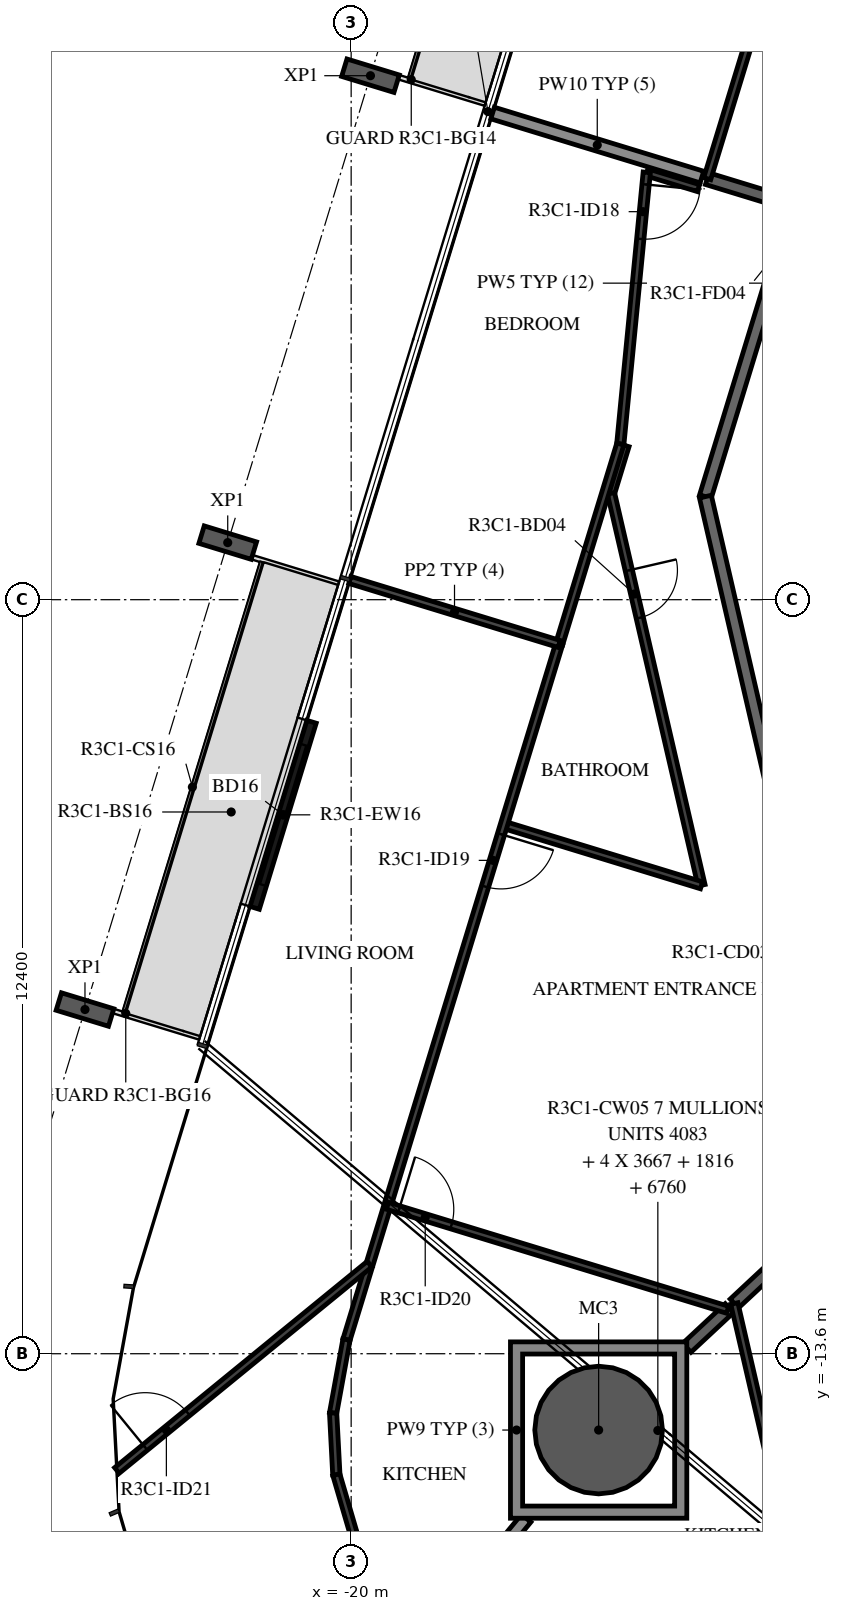
"""IFC4 building model, lengths in metres.
Left out: names, types, materials, properties, quantities, classifications, styles, units other than length and angle.
Written with IfcOpenShell. Run it as: python <this file> out.ifc"""

import sys

from ifc_helpers import new_model, si_unit, direction, frame, frame_2d, origin, origin_2d, place, context, subcontext, project, spatial, polyline, rectangle, hollow_circle, i_section, outline, extrude, element, fill, save


model = new_model("IFC4")
c1 = context("Model", 3, precision=1e-05, world=origin(), true_north=direction((0.0, 1.0)))
c2 = subcontext(c1, "Body", "Model", "MODEL_VIEW")
j1 = project(units=[si_unit("LENGTHUNIT", "METRE"), si_unit("PLANEANGLEUNIT", "RADIAN")], contexts=[c1])
p1 = place(None, origin())
s1 = spatial("IfcSite", under=j1, at=p1, CompositionType="ELEMENT")
p2 = place(p1, origin())
s2 = spatial("IfcBuilding", under=s1, at=p2, CompositionType="ELEMENT")
p3 = place(p2, frame((0.0, 0.0, 137.9)))
s3 = spatial("IfcBuildingStorey", under=s2, at=p3, CompositionType="ELEMENT", Elevation=137.9)
p4 = place(p3, frame((-15.93, -14.855, -0.38), z_axis=(0.0, 0.0, 1.0), x_axis=(1.0, 0.0, 0.0)))
e1 = element("IfcColumn", 1, at=p4, inside=s3, PredefinedType="COLUMN", context=c2, shape_type="SweptSolid", body=[
    extrude(hollow_circle(Radius=1.05, WallThickness=0.05, at=origin_2d()), origin(), (0.0, 0.0, 1.0), 3.5),
])
for number, where, z_axis, x_axis in (
    (2, (-19.682, 7.417, -0.38), (0.0, 0.0, 1.0), (0.292, 0.956, 0.0)),
    (3, (-22.03, -0.261, -0.38), (0.0, 0.0, 1.0), (0.292, 0.956, 0.0)),
    (4, (-24.377, -7.94, -0.38), (0.0, 0.0, 1.0), (0.292, 0.956, 0.0)),
):
    element("IfcColumn", number, at=place(p3, frame(where, z_axis=z_axis, x_axis=x_axis)), inside=s3, PredefinedType="COLUMN", context=c2, shape_type="SweptSolid", body=[
        extrude(i_section(OverallWidth=0.3, OverallDepth=0.9, WebThickness=0.019, FlangeThickness=0.035, FilletRadius=0.03, at=origin_2d()), origin(), (0.0, 0.0, 1.0), 3.5),
    ])
p5 = place(p3, frame((-20.651, -3.208, 0.0), z_axis=(0.0, 0.0, 1.0), x_axis=(-0.292369725807, -0.956305360976, 0.0)))
e5 = element("IfcWall", 5, at=p5, inside=s3, PredefinedType="STANDARD", context=c2, shape_type="SweptSolid", body=[
    extrude(rectangle(XDim=3.2, YDim=0.16, at=frame_2d((1.6, 0.0))), origin(), (0.0, 0.0, 1.0), 3.12),
])
p6 = place(p5, frame((0.4, 0.0, 0.0)))
e6 = element("IfcOpeningElement", 6, at=p6, cuts=e5, PredefinedType="OPENING", context=c2, shape_type="SweptSolid", body=[
    extrude(rectangle(XDim=2.4, YDim=2.4, at=frame_2d((1.2, 1.2))), frame((0.0, 0.09, 0.0), z_axis=(0.0, -1.0, 0.0), x_axis=(1.0, 0.0, 0.0)), (0.0, 0.0, 1.0), 0.18),
])
p7 = place(p3, frame((-12.028, 7.516, 0.0), z_axis=(0.0, 0.0, 1.0), x_axis=(-0.292365533182, -0.956306642771, 0.0)))
e7 = element("IfcWall", 7, at=p7, inside=s3, PredefinedType="STANDARD", context=c2, shape_type="SweptSolid", body=[
    extrude(rectangle(XDim=7.342, YDim=0.2, at=frame_2d((3.671, 0.0))), origin(), (0.0, 0.0, 1.0), 3.12),
])
p8 = place(p7, frame((2.533, 0.0, 0.0)))
e8 = element("IfcOpeningElement", 8, at=p8, cuts=e7, PredefinedType="OPENING", context=c2, shape_type="SweptSolid", body=[
    extrude(rectangle(XDim=1.0, YDim=2.1, at=frame_2d((0.5, 1.05))), frame((0.0, 0.11, 0.0), z_axis=(0.0, -1.0, 0.0), x_axis=(1.0, 0.0, 0.0)), (0.0, 0.0, 1.0), 0.22),
])
p9 = place(p3, frame((-14.175, 0.495, 0.0), z_axis=(0.0, 0.0, 1.0), x_axis=(0.224922649383, -0.974376622151, 0.0)))
e9 = element("IfcWall", 9, at=p9, inside=s3, PredefinedType="STANDARD", context=c2, shape_type="SweptSolid", body=[
    extrude(rectangle(XDim=7.342, YDim=0.2, at=frame_2d((3.671, 0.0))), origin(), (0.0, 0.0, 1.0), 3.12),
])
p10 = place(p3, frame((-14.145, 5.724, 0.0), z_axis=(0.0, 0.0, 1.0), x_axis=(0.956266872747, -0.292495586439, 0.0)))
e10 = element("IfcWall", 10, at=p10, inside=s3, PredefinedType="STANDARD", context=c2, shape_type="SweptSolid", body=[
    extrude(rectangle(XDim=1.5, YDim=0.2, at=frame_2d((0.75, 0.0))), origin(), (0.0, 0.0, 1.0), 3.12),
])
p11 = place(p3, frame((-17.674, 6.803, 0.0), z_axis=(0.0, 0.0, 1.0), x_axis=(0.956293645939, -0.292408041504, 0.0)))
e11 = element("IfcWall", 11, at=p11, inside=s3, PredefinedType="STANDARD", context=c2, shape_type="SweptSolid", body=[
    extrude(rectangle(XDim=3.6, YDim=0.2, at=frame_2d((1.8, 0.0))), origin(), (0.0, 0.0, 1.0), 2.73),
])
p12 = place(p3, frame((-13.699, -12.774, 0.0), z_axis=(0.0, 0.0, 1.0), x_axis=(0.731353758457, 0.681998299111, 0.0)))
e12 = element("IfcWall", 12, at=p12, inside=s3, PredefinedType="STANDARD", context=c2, shape_type="SweptSolid", body=[
    extrude(rectangle(XDim=5.031, YDim=0.2, at=frame_2d((2.515, 0.0))), origin(), (0.0, 0.0, 1.0), 3.12),
])
p13 = place(p3, frame((-21.0, -21.025, 0.0), z_axis=(0.0, 0.0, 1.0), x_axis=(0.634846795952, 0.772638043116, 0.0)))
e13 = element("IfcWall", 13, at=p13, inside=s3, PredefinedType="STANDARD", context=c2, shape_type="SweptSolid", body=[
    extrude(rectangle(XDim=6.109, YDim=0.2, at=frame_2d((3.055, 0.0))), origin(), (0.0, 0.0, 1.0), 2.73),
])
p14 = place(p3, frame((-14.48, -13.503, 0.0), z_axis=(0.0, 0.0, 1.0), x_axis=(0.73152991834, 0.681809341806, 0.0)))
e14 = element("IfcWall", 14, at=p14, inside=s3, PredefinedType="STANDARD", context=c2, shape_type="SweptSolid", body=[
    extrude(rectangle(XDim=0.958, YDim=0.2, at=frame_2d((0.479, 0.0))), origin(), (0.0, 0.0, 1.0), 3.12),
])
p15 = place(p3, frame((-13.345, 8.339, 0.0), z_axis=(0.0, 0.0, 1.0), x_axis=(-0.292316072367, -0.956321762712, 0.0)))
e15 = element("IfcWall", 15, at=p15, inside=s3, PredefinedType="PARTITIONING", context=c2, shape_type="SweptSolid", body=[
    extrude(rectangle(XDim=2.734, YDim=0.12, at=frame_2d((1.367, 0.0))), origin(), (0.0, 0.0, 1.0), 3.12),
])
p16 = place(p3, frame((-14.287, 5.568, 0.0), z_axis=(0.0, 0.0, 1.0), x_axis=(-0.956287662261, 0.292427609859, 0.0)))
e16 = element("IfcWall", 16, at=p16, inside=s3, PredefinedType="PARTITIONING", context=c2, shape_type="SweptSolid", body=[
    extrude(rectangle(XDim=0.89, YDim=0.12, at=frame_2d((0.445, 0.0))), origin(), (0.0, 0.0, 1.0), 3.12),
])
p17 = place(p3, frame((-15.138, 5.828, 0.0), z_axis=(0.0, 0.0, 1.0), x_axis=(-0.096967255409, -0.995287572201, 0.0)))
e17 = element("IfcWall", 17, at=p17, inside=s3, PredefinedType="PARTITIONING", context=c2, shape_type="SweptSolid", body=[
    extrude(rectangle(XDim=4.489, YDim=0.12, at=frame_2d((2.245, 0.0))), origin(), (0.0, 0.0, 1.0), 3.12),
])
p18 = place(p17, frame((0.2, 0.0, 0.0)))
e18 = element("IfcOpeningElement", 18, at=p18, cuts=e17, PredefinedType="OPENING", context=c2, shape_type="SweptSolid", body=[
    extrude(rectangle(XDim=0.9, YDim=2.1, at=frame_2d((0.45, 1.05))), frame((0.0, 0.07, 0.0), z_axis=(0.0, -1.0, 0.0), x_axis=(1.0, 0.0, 0.0)), (0.0, 0.0, 1.0), 0.14),
])
p19 = place(p3, frame((-15.487, 1.333, 0.0), z_axis=(0.0, 0.0, 1.0), x_axis=(-0.2923698127, -0.956305334411, 0.0)))
e19 = element("IfcWall", 19, at=p19, inside=s3, PredefinedType="PARTITIONING", context=c2, shape_type="SweptSolid", body=[
    extrude(rectangle(XDim=0.82, YDim=0.12, at=frame_2d((0.41, 0.0))), origin(), (0.0, 0.0, 1.0), 3.12),
])
p20 = place(p3, frame((-15.727, 0.549, 0.0), z_axis=(0.0, 0.0, 1.0), x_axis=(0.224948441297, -0.974370668051, 0.0)))
e20 = element("IfcWall", 20, at=p20, inside=s3, PredefinedType="PARTITIONING", context=c2, shape_type="SweptSolid", body=[
    extrude(rectangle(XDim=6.616, YDim=0.12, at=frame_2d((3.308, 0.0))), origin(), (0.0, 0.0, 1.0), 3.12),
])
p21 = place(p20, frame((1.3, 0.0, 0.0)))
e21 = element("IfcOpeningElement", 21, at=p21, cuts=e20, PredefinedType="OPENING", context=c2, shape_type="SweptSolid", body=[
    extrude(rectangle(XDim=0.8, YDim=2.1, at=frame_2d((0.4, 1.05))), frame((0.0, 0.07, 0.0), z_axis=(0.0, -1.0, 0.0), x_axis=(1.0, 0.0, 0.0)), (0.0, 0.0, 1.0), 0.14),
])
p22 = place(p3, frame((-14.238, -5.897, 0.0), z_axis=(0.0, 0.0, 1.0), x_axis=(-0.956314762513, 0.292338972768, 0.0)))
e22 = element("IfcWall", 22, at=p22, inside=s3, PredefinedType="PARTITIONING", context=c2, shape_type="SweptSolid", body=[
    extrude(rectangle(XDim=3.399, YDim=0.12, at=frame_2d((1.699, 0.0))), origin(), (0.0, 0.0, 1.0), 3.12),
])
p23 = place(p3, frame((-16.579, -1.928, 0.0), z_axis=(0.0, 0.0, 1.0), x_axis=(-0.29236733738, -0.956306091183, 0.0)))
e23 = element("IfcWall", 23, at=p23, inside=s3, PredefinedType="PARTITIONING", context=c2, shape_type="SweptSolid", body=[
    extrude(rectangle(XDim=11.963, YDim=0.12, at=frame_2d((5.981, 0.0))), origin(), (0.0, 0.0, 1.0), 3.12),
])
p24 = place(p23, frame((3.271, 0.0, 0.0)))
e24 = element("IfcOpeningElement", 24, at=p24, cuts=e23, PredefinedType="OPENING", context=c2, shape_type="SweptSolid", body=[
    extrude(rectangle(XDim=0.9, YDim=2.1, at=frame_2d((0.45, 1.05))), frame((0.0, 0.07, 0.0), z_axis=(0.0, -1.0, 0.0), x_axis=(1.0, 0.0, 0.0)), (0.0, 0.0, 1.0), 0.14),
])
p25 = place(p3, frame((-19.404, -11.167, 0.0), z_axis=(0.0, 0.0, 1.0), x_axis=(0.956314306829, -0.292340463423, 0.0)))
e25 = element("IfcWall", 25, at=p25, inside=s3, PredefinedType="PARTITIONING", context=c2, shape_type="SweptSolid", body=[
    extrude(rectangle(XDim=5.85, YDim=0.12, at=frame_2d((2.925, 0.0))), origin(), (0.0, 0.0, 1.0), 3.12),
])
p26 = place(p25, frame((0.2, 0.0, 0.0)))
e26 = element("IfcOpeningElement", 26, at=p26, cuts=e25, PredefinedType="OPENING", context=c2, shape_type="SweptSolid", body=[
    extrude(rectangle(XDim=0.9, YDim=2.1, at=frame_2d((0.45, 1.05))), frame((0.0, 0.07, 0.0), z_axis=(0.0, -1.0, 0.0), x_axis=(1.0, 0.0, 0.0)), (0.0, 0.0, 1.0), 0.14),
])
p27 = place(p3, frame((-16.579, -1.928, 0.0), z_axis=(0.0, 0.0, 1.0), x_axis=(0.292418780126, 0.956290362301, 0.0)))
e27 = element("IfcWall", 27, at=p27, inside=s3, PredefinedType="PARTITIONING", context=c2, shape_type="SweptSolid", body=[
    extrude(rectangle(XDim=3.438, YDim=0.12, at=frame_2d((1.719, 0.0))), origin(), (0.0, 0.0, 1.0), 3.12),
])
p28 = place(p3, frame((-20.022, -0.875, 0.0), z_axis=(0.0, 0.0, 1.0), x_axis=(0.956306810244, -0.292364985388, 0.0)))
e28 = element("IfcWall", 28, at=p28, inside=s3, PredefinedType="PARTITIONING", context=c2, shape_type="SweptSolid", body=[
    extrude(rectangle(XDim=3.6, YDim=0.12, at=frame_2d((1.8, 0.0))), origin(), (0.0, 0.0, 1.0), 2.73),
])
p29 = place(p3, frame((-23.852, -15.52, 0.0), z_axis=(0.0, 0.0, 1.0), x_axis=(0.774546990858, 0.632516370502, 0.0)))
e29 = element("IfcWall", 29, at=p29, inside=s3, PredefinedType="PARTITIONING", context=c2, shape_type="SweptSolid", body=[
    extrude(rectangle(XDim=5.365, YDim=0.12, at=frame_2d((2.682, 0.0))), origin(), (0.0, 0.0, 1.0), 3.12),
])
p30 = place(p29, frame((0.6, 0.0, 0.0)))
e30 = element("IfcOpeningElement", 30, at=p30, cuts=e29, PredefinedType="OPENING", context=c2, shape_type="SweptSolid", body=[
    extrude(rectangle(XDim=0.9, YDim=2.1, at=frame_2d((0.45, 1.05))), frame((0.0, 0.07, 0.0), z_axis=(0.0, -1.0, 0.0), x_axis=(1.0, 0.0, 0.0)), (0.0, 0.0, 1.0), 0.14),
])
p31 = place(p3, frame((-20.077, -13.368, 0.0), z_axis=(0.0, 0.0, 1.0), x_axis=(-0.179288174895, -0.983796600087, 0.0)))
e31 = element("IfcWall", 31, at=p31, inside=s3, PredefinedType="PARTITIONING", context=c2, shape_type="SweptSolid", body=[
    extrude(rectangle(XDim=1.227, YDim=0.12, at=frame_2d((0.613, 0.0))), origin(), (0.0, 0.0, 1.0), 3.12),
])
p32 = place(p3, frame((-20.297, -14.575, 0.0), z_axis=(0.0, 0.0, 1.0), x_axis=(0.052142637988, -0.998639647372, 0.0)))
e32 = element("IfcWall", 32, at=p32, inside=s3, PredefinedType="PARTITIONING", context=c2, shape_type="SweptSolid", body=[
    extrude(rectangle(XDim=1.016, YDim=0.12, at=frame_2d((0.508, 0.0))), origin(), (0.0, 0.0, 1.0), 3.12),
])
p33 = place(p3, frame((-20.244, -15.59, 0.0), z_axis=(0.0, 0.0, 1.0), x_axis=(0.281411609627, -0.959587153919, 0.0)))
e33 = element("IfcWall", 33, at=p33, inside=s3, PredefinedType="PARTITIONING", context=c2, shape_type="SweptSolid", body=[
    extrude(rectangle(XDim=1.016, YDim=0.12, at=frame_2d((0.508, 0.0))), origin(), (0.0, 0.0, 1.0), 3.12),
])
p34 = place(p3, frame((-12.366, -18.548, 0.0), z_axis=(0.0, 0.0, 1.0), x_axis=(-0.224958805164, 0.974368275335, 0.0)))
e34 = element("IfcWall", 34, at=p34, inside=s3, PredefinedType="PARTITIONING", context=c2, shape_type="SweptSolid", body=[
    extrude(rectangle(XDim=5.926, YDim=0.12, at=frame_2d((2.963, 0.0))), origin(), (0.0, 0.0, 1.0), 3.12),
])
p35 = place(p34, frame((0.2, 0.0, 0.0)))
e35 = element("IfcOpeningElement", 35, at=p35, cuts=e34, PredefinedType="OPENING", context=c2, shape_type="SweptSolid", body=[
    extrude(rectangle(XDim=0.9, YDim=2.1, at=frame_2d((0.45, 1.05))), frame((0.0, 0.07, 0.0), z_axis=(0.0, -1.0, 0.0), x_axis=(1.0, 0.0, 0.0)), (0.0, 0.0, 1.0), 0.14),
])
p36 = place(p3, frame((-14.736, -19.095, 0.0), z_axis=(0.0, 0.0, 1.0), x_axis=(0.974368335243, 0.224958545682, 0.0)))
e36 = element("IfcWall", 36, at=p36, inside=s3, PredefinedType="PARTITIONING", context=c2, shape_type="SweptSolid", body=[
    extrude(rectangle(XDim=19.263, YDim=0.12, at=frame_2d((9.632, 0.0))), origin(), (0.0, 0.0, 1.0), 3.12),
])
p37 = place(p36, frame((2.993, 0.0, 0.0)))
e37 = element("IfcOpeningElement", 37, at=p37, cuts=e36, PredefinedType="OPENING", context=c2, shape_type="SweptSolid", body=[
    extrude(rectangle(XDim=0.9, YDim=2.1, at=frame_2d((0.45, 1.05))), frame((0.0, 0.07, 0.0), z_axis=(0.0, -1.0, 0.0), x_axis=(1.0, 0.0, 0.0)), (0.0, 0.0, 1.0), 0.14),
])
p38 = place(p36, frame((6.81, 0.0, 0.0)))
e38 = element("IfcOpeningElement", 38, at=p38, cuts=e36, PredefinedType="OPENING", context=c2, shape_type="SweptSolid", body=[
    extrude(rectangle(XDim=0.9, YDim=2.1, at=frame_2d((0.45, 1.05))), frame((0.0, 0.07, 0.0), z_axis=(0.0, -1.0, 0.0), x_axis=(1.0, 0.0, 0.0)), (0.0, 0.0, 1.0), 0.14),
])
p39 = place(p36, frame((0.2, 0.0, 0.0)))
e39 = element("IfcOpeningElement", 39, at=p39, cuts=e36, PredefinedType="OPENING", context=c2, shape_type="SweptSolid", body=[
    extrude(rectangle(XDim=0.9, YDim=2.1, at=frame_2d((0.45, 1.05))), frame((0.0, 0.07, 0.0), z_axis=(0.0, -1.0, 0.0), x_axis=(1.0, 0.0, 0.0)), (0.0, 0.0, 1.0), 0.14),
])
p40 = place(p36, frame((14.839, 0.0, 0.0)))
e40 = element("IfcOpeningElement", 40, at=p40, cuts=e36, PredefinedType="OPENING", context=c2, shape_type="SweptSolid", body=[
    extrude(rectangle(XDim=0.9, YDim=2.1, at=frame_2d((0.45, 1.05))), frame((0.0, 0.07, 0.0), z_axis=(0.0, -1.0, 0.0), x_axis=(1.0, 0.0, 0.0)), (0.0, 0.0, 1.0), 0.14),
])
p41 = place(p3, origin())
e41 = element("IfcWall", 41, at=p41, inside=s3, PredefinedType="STANDARD", context=c2, shape_type="SweptSolid", body=[
    extrude(outline(polyline([(-14.48, -13.405), (-14.48, -16.305), (-17.38, -16.305), (-17.38, -13.405), (-14.48, -13.405)]), holes=[polyline([(-17.18, -16.105), (-14.68, -16.105), (-14.68, -13.605), (-17.18, -13.605), (-17.18, -16.105)])]), origin(), (0.0, 0.0, 1.0), 3.12),
])
p42 = place(p6, origin())
e42 = element("IfcDoor", 42, at=p42, inside=s3, OperationType="DOUBLE_DOOR_SLIDING", PredefinedType="DOOR", context=c2, shape_type="SweptSolid", body=[
    extrude(rectangle(XDim=2.4, YDim=2.4, at=frame_2d((1.2, 1.2))), frame((0.0, 0.025, 0.0), z_axis=(0.0, -1.0, 0.0), x_axis=(1.0, 0.0, 0.0)), (0.0, 0.0, 1.0), 0.05),
])
fill(e6, e42)
p43 = place(p18, origin())
e43 = element("IfcDoor", 43, at=p43, inside=s3, OperationType="SINGLE_SWING_LEFT", PredefinedType="DOOR", context=c2, shape_type="SweptSolid", body=[
    extrude(rectangle(XDim=0.9, YDim=2.1, at=frame_2d((0.45, 1.05))), frame((0.0, 0.025, 0.0), z_axis=(0.0, -1.0, 0.0), x_axis=(1.0, 0.0, 0.0)), (0.0, 0.0, 1.0), 0.05),
])
fill(e18, e43)
p44 = place(p21, origin())
e44 = element("IfcDoor", 44, at=p44, inside=s3, OperationType="SINGLE_SWING_RIGHT", PredefinedType="DOOR", context=c2, shape_type="SweptSolid", body=[
    extrude(rectangle(XDim=0.8, YDim=2.1, at=frame_2d((0.4, 1.05))), frame((0.0, 0.025, 0.0), z_axis=(0.0, -1.0, 0.0), x_axis=(1.0, 0.0, 0.0)), (0.0, 0.0, 1.0), 0.05),
])
fill(e21, e44)
p45 = place(p24, origin())
e45 = element("IfcDoor", 45, at=p45, inside=s3, OperationType="SINGLE_SWING_RIGHT", PredefinedType="DOOR", context=c2, shape_type="SweptSolid", body=[
    extrude(rectangle(XDim=0.9, YDim=2.1, at=frame_2d((0.45, 1.05))), frame((0.0, 0.025, 0.0), z_axis=(0.0, -1.0, 0.0), x_axis=(1.0, 0.0, 0.0)), (0.0, 0.0, 1.0), 0.05),
])
fill(e24, e45)
p46 = place(p26, origin())
e46 = element("IfcDoor", 46, at=p46, inside=s3, OperationType="SINGLE_SWING_RIGHT", PredefinedType="DOOR", context=c2, shape_type="SweptSolid", body=[
    extrude(rectangle(XDim=0.9, YDim=2.1, at=frame_2d((0.45, 1.05))), frame((0.0, 0.025, 0.0), z_axis=(0.0, -1.0, 0.0), x_axis=(1.0, 0.0, 0.0)), (0.0, 0.0, 1.0), 0.05),
])
fill(e26, e46)
p47 = place(p30, origin())
e47 = element("IfcDoor", 47, at=p47, inside=s3, OperationType="SINGLE_SWING_RIGHT", PredefinedType="DOOR", context=c2, shape_type="SweptSolid", body=[
    extrude(rectangle(XDim=0.9, YDim=2.1, at=frame_2d((0.45, 1.05))), frame((0.0, 0.025, 0.0), z_axis=(0.0, -1.0, 0.0), x_axis=(1.0, 0.0, 0.0)), (0.0, 0.0, 1.0), 0.05),
])
fill(e30, e47)
save(model, sys.argv[1])
